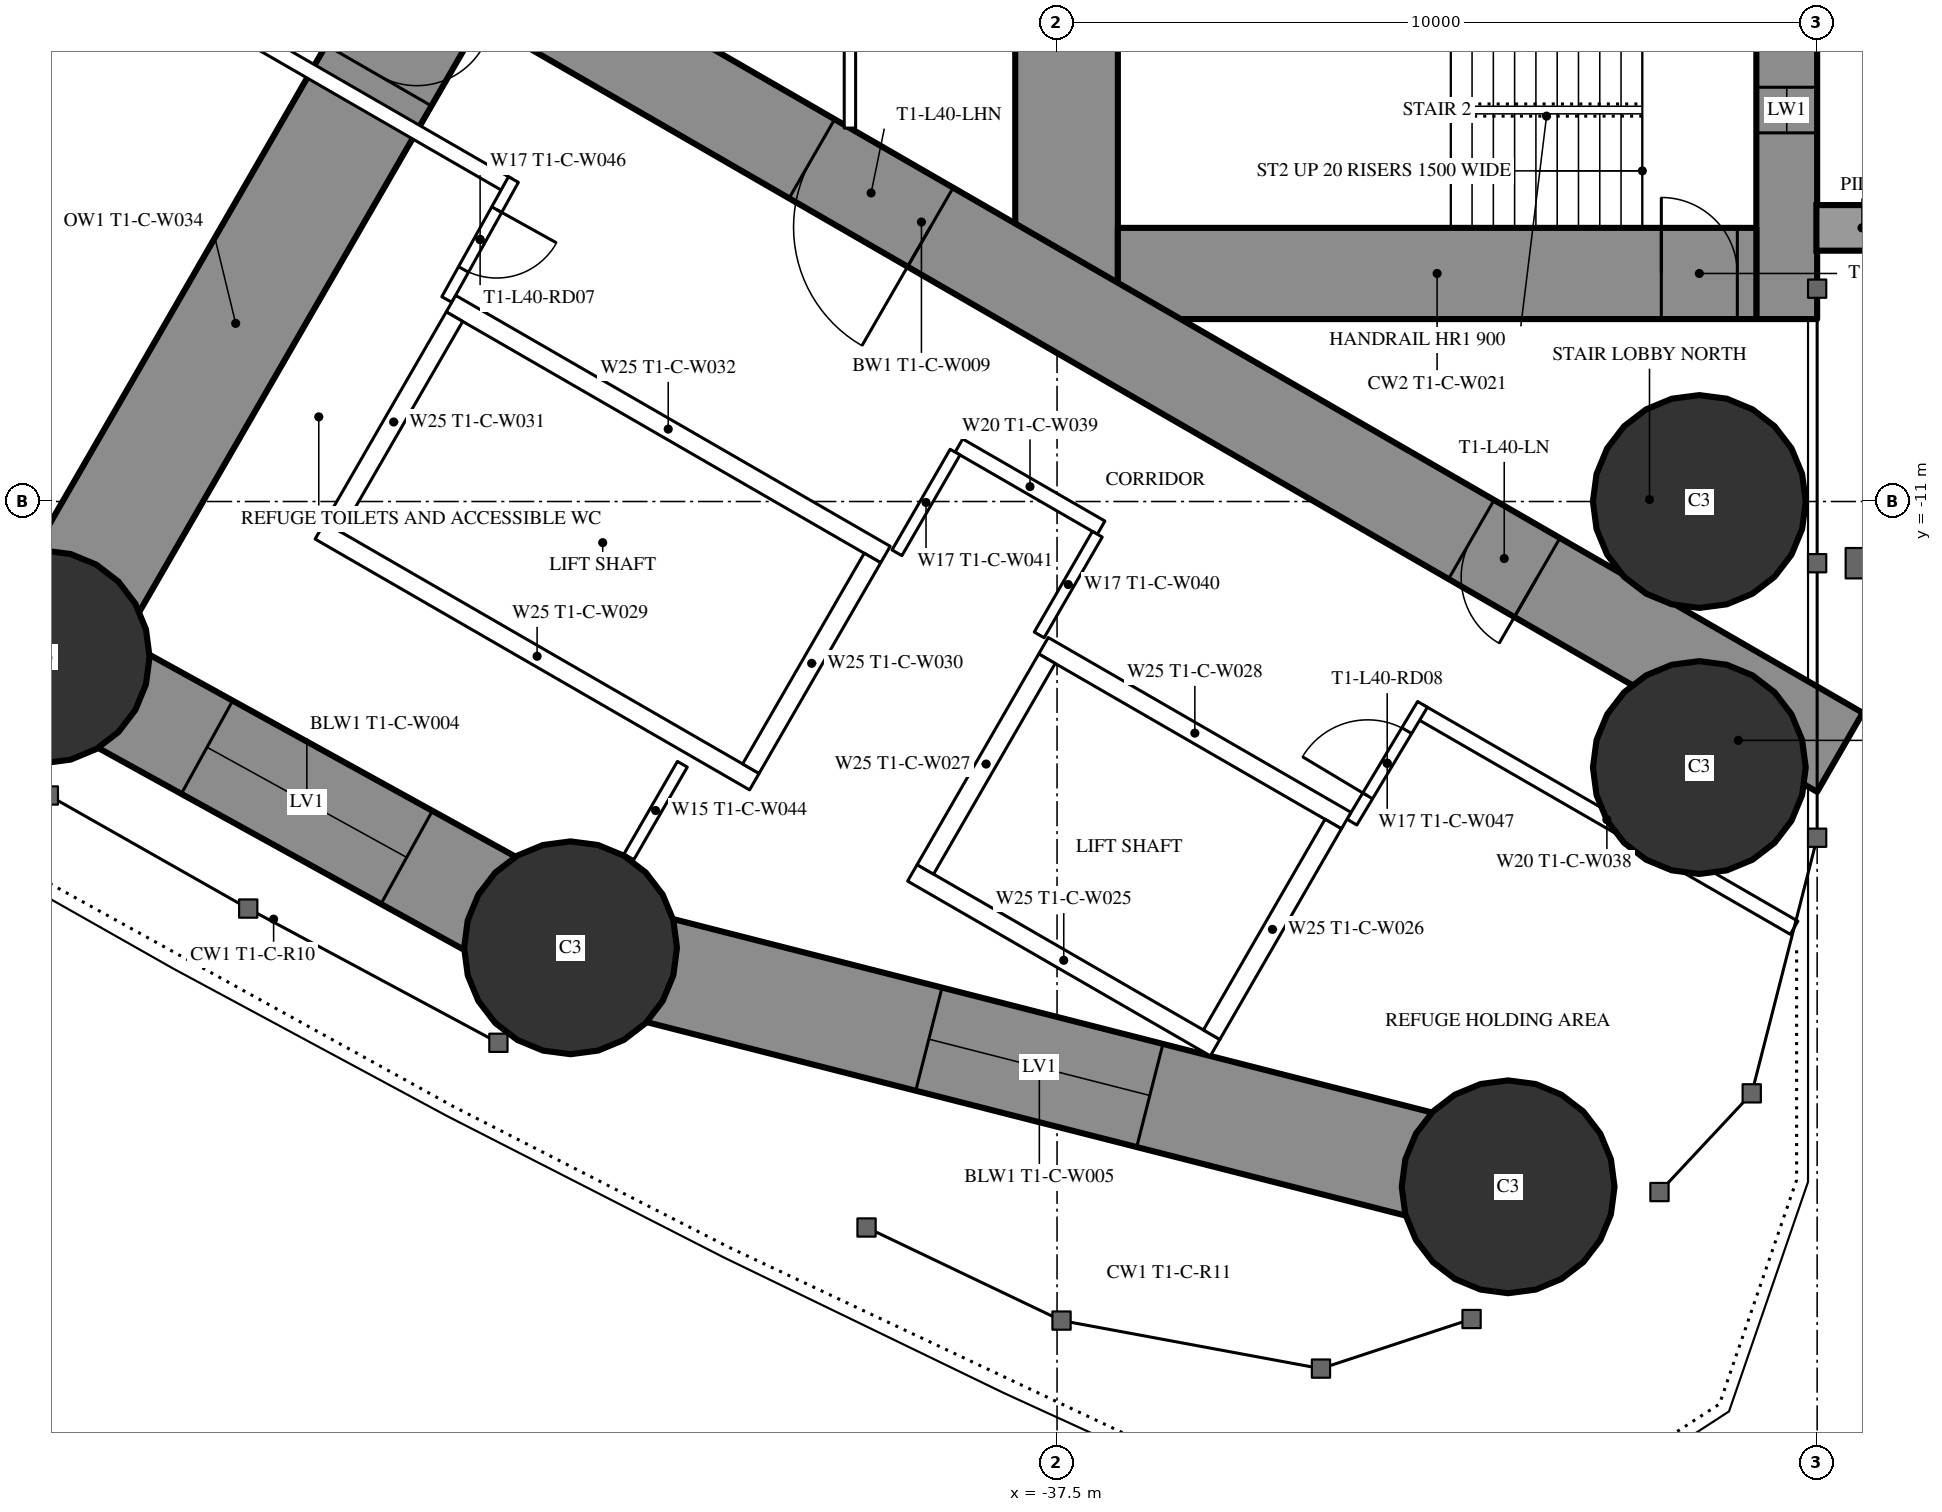
"""IFC4 building model, lengths in metres.
Left out: names, types, materials, properties, quantities, classifications, styles, units other than length and angle.
Written with IfcOpenShell. Run it as: python <this file> out.ifc"""

import sys

from ifc_helpers import new_model, si_unit, direction, frame, frame_2d, origin, origin_2d, place, context, subcontext, project, spatial, rectangle, circle, extrude, element, fill, save


model = new_model("IFC4")
c1 = context("Model", 3, precision=1e-05, world=origin(), true_north=direction((0.0, 1.0)))
c2 = subcontext(c1, "Body", "Model", "MODEL_VIEW")
j1 = project(units=[si_unit("LENGTHUNIT", "METRE"), si_unit("PLANEANGLEUNIT", "RADIAN")], contexts=[c1])
p1 = place(None, origin())
s1 = spatial("IfcSite", under=j1, at=p1, CompositionType="ELEMENT")
p2 = place(p1, origin())
s2 = spatial("IfcBuilding", under=s1, at=p2, CompositionType="ELEMENT")
p3 = place(p2, frame((0.0, 0.0, 152.7)))
s3 = spatial("IfcBuildingStorey", under=s2, at=p3, CompositionType="ELEMENT", Elevation=152.7)
for number, where, z_axis, x_axis in (
    (1, (-31.565, -20.016, 0.0), (0.0, 0.0, 1.0), (1.0, 0.0, 0.0)),
    (2, (-29.05, -11.0, 0.0), (0.0, 0.0, 1.0), (1.0, 0.0, 0.0)),
    (3, (-29.05, -14.5, 0.0), (0.0, 0.0, 1.0), (1.0, 0.0, 0.0)),
    (4, (-50.839, -13.043, 0.0), (0.0, 0.0, 1.0), (1.0, 0.0, 0.0)),
    (5, (-43.9, -16.871, 0.0), (0.0, 0.0, 1.0), (1.0, 0.0, 0.0)),
):
    element("IfcColumn", number, at=place(p3, frame(where, z_axis=z_axis, x_axis=x_axis)), inside=s3, PredefinedType="COLUMN", context=c2, shape_type="SweptSolid", body=[
        extrude(circle(Radius=1.4, at=origin_2d()), origin(), (0.0, 0.0, 1.0), 3.6),
    ])
p4 = place(p3, frame((-27.9, 8.6, 0.0), z_axis=(0.0, 0.0, 1.0), x_axis=(0.0, -1.0, 0.0)))
e6 = element("IfcWall", 6, at=p4, inside=s3, PredefinedType="SHEAR", context=c2, shape_type="SweptSolid", body=[
    extrude(rectangle(XDim=17.2, YDim=0.8, at=frame_2d((8.6, 0.0))), origin(), (0.0, 0.0, 1.0), 3.6),
])
p5 = place(p4, frame((2.45, 0.0, 0.6)))
e7 = element("IfcOpeningElement", 7, at=p5, cuts=e6, PredefinedType="OPENING", context=c2, shape_type="SweptSolid", body=[
    extrude(rectangle(XDim=0.6, YDim=2.1, at=frame_2d((0.3, 1.05))), frame((0.0, 0.41, 0.0), z_axis=(0.0, -1.0, 0.0), x_axis=(1.0, 0.0, 0.0)), (0.0, 0.0, 1.0), 0.82),
])
p6 = place(p4, frame((14.15, 0.0, 0.6)))
e8 = element("IfcOpeningElement", 8, at=p6, cuts=e6, PredefinedType="OPENING", context=c2, shape_type="SweptSolid", body=[
    extrude(rectangle(XDim=0.6, YDim=2.1, at=frame_2d((0.3, 1.05))), frame((0.0, 0.41, 0.0), z_axis=(0.0, -1.0, 0.0), x_axis=(1.0, 0.0, 0.0)), (0.0, 0.0, 1.0), 0.82),
])
p7 = place(p3, frame((-37.375, 8.6, 0.0), z_axis=(0.0, 0.0, 1.0), x_axis=(0.0, -1.0, 0.0)))
e9 = element("IfcWall", 9, at=p7, inside=s3, PredefinedType="SHEAR", context=c2, shape_type="SweptSolid", body=[
    extrude(rectangle(XDim=17.2, YDim=1.35, at=frame_2d((8.6, 0.0))), origin(), (0.0, 0.0, 1.0), 3.6),
])
p8 = place(p7, frame((7.7, 0.0, 0.0)))
e10 = element("IfcOpeningElement", 10, at=p8, cuts=e9, PredefinedType="OPENING", context=c2, shape_type="SweptSolid", body=[
    extrude(rectangle(XDim=1.8, YDim=2.2, at=frame_2d((0.9, 1.1))), frame((0.0, 0.685, 0.0), z_axis=(0.0, -1.0, 0.0), x_axis=(1.0, 0.0, 0.0)), (0.0, 0.0, 1.0), 1.37),
])
p9 = place(p3, frame((-28.3, -8.0, 0.0), z_axis=(0.0, 0.0, 1.0), x_axis=(-1.0, 0.0, 0.0)))
e11 = element("IfcWall", 11, at=p9, inside=s3, PredefinedType="SHEAR", context=c2, shape_type="SweptSolid", body=[
    extrude(rectangle(XDim=8.4, YDim=1.2, at=frame_2d((4.2, 0.0))), origin(), (0.0, 0.0, 1.0), 3.6),
])
p10 = place(p9, frame((0.25, 0.0, 0.0)))
e12 = element("IfcOpeningElement", 12, at=p10, cuts=e11, PredefinedType="OPENING", context=c2, shape_type="SweptSolid", body=[
    extrude(rectangle(XDim=1.0, YDim=2.2, at=frame_2d((0.5, 1.1))), frame((0.0, 0.61, 0.0), z_axis=(0.0, -1.0, 0.0), x_axis=(1.0, 0.0, 0.0)), (0.0, 0.0, 1.0), 1.22),
])
p11 = place(p3, frame((-27.2, -14.3, 0.0), z_axis=(0.0, 0.0, 1.0), x_axis=(-0.866024021859, 0.500002393557, 0.0)))
e13 = element("IfcWall", 13, at=p11, inside=s3, PredefinedType="SHEAR", context=c2, shape_type="SweptSolid", body=[
    extrude(rectangle(XDim=27.907, YDim=1.2, at=frame_2d((13.954, 0.0))), origin(), (0.0, 0.0, 1.0), 3.6),
])
p12 = place(p11, frame((4.6, 0.0, 0.0)))
e14 = element("IfcOpeningElement", 14, at=p12, cuts=e13, PredefinedType="OPENING", context=c2, shape_type="SweptSolid", body=[
    extrude(rectangle(XDim=1.0, YDim=2.2, at=frame_2d((0.5, 1.1))), frame((0.0, 0.61, 0.0), z_axis=(0.0, -1.0, 0.0), x_axis=(1.0, 0.0, 0.0)), (0.0, 0.0, 1.0), 1.22),
])
p13 = place(p11, frame((13.818, 0.0, 0.0)))
e15 = element("IfcOpeningElement", 15, at=p13, cuts=e13, PredefinedType="OPENING", context=c2, shape_type="SweptSolid", body=[
    extrude(rectangle(XDim=1.8, YDim=2.2, at=frame_2d((0.9, 1.1))), frame((0.0, 0.61, 0.0), z_axis=(0.0, -1.0, 0.0), x_axis=(1.0, 0.0, 0.0)), (0.0, 0.0, 1.0), 1.22),
])
p14 = place(p3, frame((-45.773, -4.27, 0.0), z_axis=(0.0, 0.0, 1.0), x_axis=(-0.499995723283, -0.866027872934, 0.0)))
e16 = element("IfcWall", 16, at=p14, inside=s3, PredefinedType="SHEAR", context=c2, shape_type="SweptSolid", body=[
    extrude(rectangle(XDim=10.131, YDim=1.6, at=frame_2d((5.065, 0.0))), origin(), (0.0, 0.0, 1.0), 3.6),
])
p15 = place(p14, frame((0.3, 0.0, 0.0)))
e17 = element("IfcOpeningElement", 17, at=p15, cuts=e16, PredefinedType="OPENING", context=c2, shape_type="SweptSolid", body=[
    extrude(rectangle(XDim=1.0, YDim=2.2, at=frame_2d((0.5, 1.1))), frame((0.0, 0.81, 0.0), z_axis=(0.0, -1.0, 0.0), x_axis=(1.0, 0.0, 0.0)), (0.0, 0.0, 1.0), 1.62),
])
p16 = place(p3, frame((-57.59, -8.893, 0.0), z_axis=(0.0, 0.0, 1.0), x_axis=(0.851892008043, -0.523717487423, 0.0)))
e18 = element("IfcWall", 18, at=p16, inside=s3, PredefinedType="SHEAR", context=c2, shape_type="SweptSolid", body=[
    extrude(rectangle(XDim=7.924, YDim=1.4, at=frame_2d((3.962, 0.0))), origin(), (0.0, 0.0, 1.0), 3.6),
])
p17 = place(p16, frame((2.462, 0.0, 0.6)))
e19 = element("IfcOpeningElement", 19, at=p17, cuts=e18, PredefinedType="OPENING", context=c2, shape_type="SweptSolid", body=[
    extrude(rectangle(XDim=3.0, YDim=1.2, at=frame_2d((1.5, 0.6))), frame((0.0, 0.71, 0.0), z_axis=(0.0, -1.0, 0.0), x_axis=(1.0, 0.0, 0.0)), (0.0, 0.0, 1.0), 1.42),
])
p18 = place(p3, frame((-50.839, -13.043, 0.0), z_axis=(0.0, 0.0, 1.0), x_axis=(0.875577684027, -0.483077342911, 0.0)))
e20 = element("IfcWall", 20, at=p18, inside=s3, PredefinedType="SHEAR", context=c2, shape_type="SweptSolid", body=[
    extrude(rectangle(XDim=7.925, YDim=1.4, at=frame_2d((3.962, 0.0))), origin(), (0.0, 0.0, 1.0), 3.6),
])
p19 = place(p18, frame((2.462, 0.0, 0.6)))
e21 = element("IfcOpeningElement", 21, at=p19, cuts=e20, PredefinedType="OPENING", context=c2, shape_type="SweptSolid", body=[
    extrude(rectangle(XDim=3.0, YDim=1.2, at=frame_2d((1.5, 0.6))), frame((0.0, 0.71, 0.0), z_axis=(0.0, -1.0, 0.0), x_axis=(1.0, 0.0, 0.0)), (0.0, 0.0, 1.0), 1.42),
])
p20 = place(p3, frame((-43.9, -16.871, 0.0), z_axis=(0.0, 0.0, 1.0), x_axis=(0.969008414312, -0.247027717052, 0.0)))
e22 = element("IfcWall", 22, at=p20, inside=s3, PredefinedType="SHEAR", context=c2, shape_type="SweptSolid", body=[
    extrude(rectangle(XDim=12.729, YDim=1.4, at=frame_2d((6.365, 0.0))), origin(), (0.0, 0.0, 1.0), 3.6),
])
p21 = place(p20, frame((4.865, 0.0, 0.6)))
e23 = element("IfcOpeningElement", 23, at=p21, cuts=e22, PredefinedType="OPENING", context=c2, shape_type="SweptSolid", body=[
    extrude(rectangle(XDim=3.0, YDim=1.2, at=frame_2d((1.5, 0.6))), frame((0.0, 0.71, 0.0), z_axis=(0.0, -1.0, 0.0), x_axis=(1.0, 0.0, 0.0)), (0.0, 0.0, 1.0), 1.42),
])
p22 = place(p3, frame((-42.429, -14.457, 0.0), z_axis=(0.0, 0.0, 1.0), x_axis=(-0.5000578829, -0.865991982497, 0.0)))
e24 = element("IfcWall", 24, at=p22, inside=s3, PredefinedType="PARTITIONING", context=c2, shape_type="SweptSolid", body=[
    extrude(rectangle(XDim=1.407, YDim=0.15, at=frame_2d((0.704, 0.0))), origin(), (0.0, 0.0, 1.0), 3.35),
])
p23 = place(p3, frame((-27.803, -16.608, 0.0), z_axis=(0.0, 0.0, 1.0), x_axis=(-0.866021198669, 0.500007283403, 0.0)))
e25 = element("IfcWall", 25, at=p23, inside=s3, PredefinedType="PARTITIONING", context=c2, shape_type="SweptSolid", body=[
    extrude(rectangle(XDim=5.688, YDim=0.2, at=frame_2d((2.844, 0.0))), origin(), (0.0, 0.0, 1.0), 3.35),
])
p24 = place(p3, frame((-36.92, -11.344, 0.0), z_axis=(0.0, 0.0, 1.0), x_axis=(-0.866065156741, 0.499931139538, 0.0)))
e26 = element("IfcWall", 26, at=p24, inside=s3, PredefinedType="PARTITIONING", context=c2, shape_type="SweptSolid", body=[
    extrude(rectangle(XDim=2.16, YDim=0.2, at=frame_2d((1.08, 0.0))), origin(), (0.0, 0.0, 1.0), 3.35),
])
p25 = place(p3, frame((-44.715, -6.844, 0.0), z_axis=(0.0, 0.0, 1.0), x_axis=(-0.866025261224, 0.500000246922, 0.0)))
e27 = element("IfcWall", 27, at=p25, inside=s3, PredefinedType="PARTITIONING", context=c2, shape_type="SweptSolid", body=[
    extrude(rectangle(XDim=13.567, YDim=0.2, at=frame_2d((6.783, 0.0))), origin(), (0.0, 0.0, 1.0), 3.35),
])
p26 = place(p25, frame((6.719, 0.0, 0.0)))
e28 = element("IfcOpeningElement", 28, at=p26, cuts=e27, PredefinedType="OPENING", context=c2, shape_type="SweptSolid", body=[
    extrude(rectangle(XDim=1.8, YDim=2.2, at=frame_2d((0.9, 1.1))), frame((0.0, 0.11, 0.0), z_axis=(0.0, -1.0, 0.0), x_axis=(1.0, 0.0, 0.0)), (0.0, 0.0, 1.0), 0.22),
])
p27 = place(p3, frame((-44.652, -6.764, 0.0), z_axis=(0.0, 0.0, 1.0), x_axis=(-0.485528096672, -0.8742210632, 0.0)))
e29 = element("IfcWall", 29, at=p27, inside=s3, PredefinedType="PARTITIONING", context=c2, shape_type="SweptSolid", body=[
    extrude(rectangle(XDim=1.805, YDim=0.15, at=frame_2d((0.903, 0.0))), origin(), (0.0, 0.0, 1.0), 3.35),
])
p28 = place(p27, frame((0.453, 0.0, 0.0)))
e30 = element("IfcOpeningElement", 30, at=p28, cuts=e29, PredefinedType="OPENING", context=c2, shape_type="SweptSolid", body=[
    extrude(rectangle(XDim=0.9, YDim=2.04, at=frame_2d((0.45, 1.02))), frame((0.0, 0.085, 0.0), z_axis=(0.0, -1.0, 0.0), x_axis=(1.0, 0.0, 0.0)), (0.0, 0.0, 1.0), 0.17),
])
p29 = place(p3, frame((-33.621, -15.218, 0.0), z_axis=(0.0, 0.0, 1.0), x_axis=(0.514336634837, 0.857588377991, 0.0)))
e31 = element("IfcWall", 31, at=p29, inside=s3, PredefinedType="PARTITIONING", context=c2, shape_type="SweptSolid", body=[
    extrude(rectangle(XDim=1.805, YDim=0.15, at=frame_2d((0.903, 0.0))), origin(), (0.0, 0.0, 1.0), 3.35),
])
p30 = place(p29, frame((0.403, 0.0, 0.0)))
e32 = element("IfcOpeningElement", 32, at=p30, cuts=e31, PredefinedType="OPENING", context=c2, shape_type="SweptSolid", body=[
    extrude(rectangle(XDim=1.0, YDim=2.04, at=frame_2d((0.5, 1.02))), frame((0.0, 0.085, 0.0), z_axis=(0.0, -1.0, 0.0), x_axis=(1.0, 0.0, 0.0)), (0.0, 0.0, 1.0), 0.17),
])
p31 = place(p3, frame((-36.97, -11.43, 0.0), z_axis=(0.0, 0.0, 1.0), x_axis=(-0.499985008713, -0.866034058835, 0.0)))
e33 = element("IfcWall", 33, at=p31, inside=s3, PredefinedType="PARTITIONING", context=c2, shape_type="SweptSolid", body=[
    extrude(rectangle(XDim=1.529, YDim=0.15, at=frame_2d((0.765, 0.0))), origin(), (0.0, 0.0, 1.0), 3.35),
])
p32 = place(p3, frame((-38.841, -10.35, 0.0), z_axis=(0.0, 0.0, 1.0), x_axis=(-0.499966498333, -0.866044745117, 0.0)))
e34 = element("IfcWall", 34, at=p32, inside=s3, PredefinedType="PARTITIONING", context=c2, shape_type="SweptSolid", body=[
    extrude(rectangle(XDim=1.53, YDim=0.15, at=frame_2d((0.765, 0.0))), origin(), (0.0, 0.0, 1.0), 3.35),
])
p33 = place(p3, frame((-40.225, 6.087, 0.0), z_axis=(0.0, 0.0, 1.0), x_axis=(0.0, -1.0, 0.0)))
e35 = element("IfcWall", 35, at=p33, inside=s3, PredefinedType="PARTITIONING", context=c2, shape_type="SweptSolid", body=[
    extrude(rectangle(XDim=12.174, YDim=0.15, at=frame_2d((6.087, 0.0))), origin(), (0.0, 0.0, 1.0), 3.35),
])
p34 = place(p33, frame((5.187, 0.0, 0.0)))
e36 = element("IfcOpeningElement", 36, at=p34, cuts=e35, PredefinedType="OPENING", context=c2, shape_type="SweptSolid", body=[
    extrude(rectangle(XDim=1.8, YDim=2.2, at=frame_2d((0.9, 1.1))), frame((0.0, 0.085, 0.0), z_axis=(0.0, -1.0, 0.0), x_axis=(1.0, 0.0, 0.0)), (0.0, 0.0, 1.0), 0.17),
])
p35 = place(p3, frame((-33.696, -15.197, 0.0), z_axis=(0.0, 0.0, 1.0), x_axis=(-0.865976953817, 0.500083908417, 0.0)))
e37 = element("IfcWall", 37, at=p35, inside=s3, PredefinedType="PARTITIONING", context=c2, shape_type="SweptSolid", body=[
    extrude(rectangle(XDim=4.599, YDim=0.25, at=frame_2d((2.3, 0.0))), origin(), (0.0, 0.0, 1.0), 3.35),
])
p36 = place(p3, frame((-35.42, -18.186, 0.0), z_axis=(0.0, 0.0, 1.0), x_axis=(-0.865990227814, 0.50006092162, 0.0)))
e38 = element("IfcWall", 38, at=p36, inside=s3, PredefinedType="PARTITIONING", context=c2, shape_type="SweptSolid", body=[
    extrude(rectangle(XDim=4.6, YDim=0.25, at=frame_2d((2.3, 0.0))), origin(), (0.0, 0.0, 1.0), 3.35),
])
p37 = place(p3, frame((-33.866, -15.243, 0.0), z_axis=(0.0, 0.0, 1.0), x_axis=(-0.499929347863, -0.866066190972, 0.0)))
e39 = element("IfcWall", 39, at=p37, inside=s3, PredefinedType="PARTITIONING", context=c2, shape_type="SweptSolid", body=[
    extrude(rectangle(XDim=3.201, YDim=0.25, at=frame_2d((1.6, 0.0))), origin(), (0.0, 0.0, 1.0), 3.35),
])
p38 = place(p3, frame((-37.633, -13.068, 0.0), z_axis=(0.0, 0.0, 1.0), x_axis=(-0.499872130319, -0.866099216793, 0.0)))
e40 = element("IfcWall", 40, at=p38, inside=s3, PredefinedType="PARTITIONING", context=c2, shape_type="SweptSolid", body=[
    extrude(rectangle(XDim=3.2, YDim=0.25, at=frame_2d((1.6, 0.0))), origin(), (0.0, 0.0, 1.0), 3.35),
])
p39 = place(p3, frame((-39.758, -11.697, 0.0), z_axis=(0.0, 0.0, 1.0), x_axis=(-0.866024194504, 0.500002094529, 0.0)))
e41 = element("IfcWall", 41, at=p39, inside=s3, PredefinedType="PARTITIONING", context=c2, shape_type="SweptSolid", body=[
    extrude(rectangle(XDim=6.6, YDim=0.25, at=frame_2d((3.3, 0.0))), origin(), (0.0, 0.0, 1.0), 3.35),
])
p40 = place(p3, frame((-41.482, -14.686, 0.0), z_axis=(0.0, 0.0, 1.0), x_axis=(-0.86603344179, 0.499986077507, 0.0)))
e42 = element("IfcWall", 42, at=p40, inside=s3, PredefinedType="PARTITIONING", context=c2, shape_type="SweptSolid", body=[
    extrude(rectangle(XDim=6.6, YDim=0.25, at=frame_2d((3.3, 0.0))), origin(), (0.0, 0.0, 1.0), 3.35),
])
for number, where, z_axis, x_axis in (
    (43, (-39.928, -11.743, 0.0), (0.0, 0.0, 1.0), (-0.5, -0.866, 0.0)),
    (44, (-45.428, -8.568, 0.0), (0.0, 0.0, 1.0), (-0.5, -0.866, 0.0)),
):
    element("IfcWall", number, at=place(p3, frame(where, z_axis=z_axis, x_axis=x_axis)), inside=s3, PredefinedType="PARTITIONING", context=c2, shape_type="SweptSolid", body=[
        extrude(rectangle(XDim=3.201, YDim=0.25, at=frame_2d((1.6, 0.0))), origin(), (0.0, 0.0, 1.0), 3.35),
    ])
p41 = place(p19, origin())
e45 = element("IfcWindow", 45, at=p41, inside=s3, PartitioningType="SINGLE_PANEL", PredefinedType="WINDOW", context=c2, shape_type="SweptSolid", body=[
    extrude(rectangle(XDim=3.0, YDim=1.2, at=frame_2d((1.5, 0.6))), frame((0.0, 0.03, 0.0), z_axis=(0.0, -1.0, 0.0), x_axis=(1.0, 0.0, 0.0)), (0.0, 0.0, 1.0), 0.06),
])
fill(e21, e45)
p42 = place(p21, origin())
e46 = element("IfcWindow", 46, at=p42, inside=s3, PartitioningType="SINGLE_PANEL", PredefinedType="WINDOW", context=c2, shape_type="SweptSolid", body=[
    extrude(rectangle(XDim=3.0, YDim=1.2, at=frame_2d((1.5, 0.6))), frame((0.0, 0.03, 0.0), z_axis=(0.0, -1.0, 0.0), x_axis=(1.0, 0.0, 0.0)), (0.0, 0.0, 1.0), 0.06),
])
fill(e23, e46)
p43 = place(p15, origin())
e47 = element("IfcDoor", 47, at=p43, inside=s3, OperationType="SINGLE_SWING_LEFT", PredefinedType="DOOR", context=c2, shape_type="SweptSolid", body=[
    extrude(rectangle(XDim=1.0, YDim=2.2, at=frame_2d((0.5, 1.1))), frame((0.0, 0.025, 0.0), z_axis=(0.0, -1.0, 0.0), x_axis=(1.0, 0.0, 0.0)), (0.0, 0.0, 1.0), 0.05),
])
fill(e17, e47)
p44 = place(p28, origin())
e48 = element("IfcDoor", 48, at=p44, inside=s3, OperationType="SINGLE_SWING_LEFT", PredefinedType="DOOR", context=c2, shape_type="SweptSolid", body=[
    extrude(rectangle(XDim=0.9, YDim=2.04, at=frame_2d((0.45, 1.02))), frame((0.0, 0.025, 0.0), z_axis=(0.0, -1.0, 0.0), x_axis=(1.0, 0.0, 0.0)), (0.0, 0.0, 1.0), 0.05),
])
fill(e30, e48)
p45 = place(p30, origin())
e49 = element("IfcDoor", 49, at=p45, inside=s3, OperationType="SINGLE_SWING_LEFT", PredefinedType="DOOR", context=c2, shape_type="SweptSolid", body=[
    extrude(rectangle(XDim=1.0, YDim=2.04, at=frame_2d((0.5, 1.02))), frame((0.0, 0.025, 0.0), z_axis=(0.0, -1.0, 0.0), x_axis=(1.0, 0.0, 0.0)), (0.0, 0.0, 1.0), 0.05),
])
fill(e32, e49)
p46 = place(p12, origin())
e50 = element("IfcDoor", 50, at=p46, inside=s3, OperationType="SINGLE_SWING_LEFT", PredefinedType="DOOR", context=c2, shape_type="SweptSolid", body=[
    extrude(rectangle(XDim=1.0, YDim=2.2, at=frame_2d((0.5, 1.1))), frame((0.0, 0.025, 0.0), z_axis=(0.0, -1.0, 0.0), x_axis=(1.0, 0.0, 0.0)), (0.0, 0.0, 1.0), 0.05),
])
fill(e14, e50)
p47 = place(p13, origin())
e51 = element("IfcDoor", 51, at=p47, inside=s3, OperationType="DOUBLE_DOOR_SINGLE_SWING", PredefinedType="DOOR", context=c2, shape_type="SweptSolid", body=[
    extrude(rectangle(XDim=1.8, YDim=2.2, at=frame_2d((0.9, 1.1))), frame((0.0, 0.025, 0.0), z_axis=(0.0, -1.0, 0.0), x_axis=(1.0, 0.0, 0.0)), (0.0, 0.0, 1.0), 0.05),
])
fill(e15, e51)
p48 = place(p10, origin())
e52 = element("IfcDoor", 52, at=p48, inside=s3, OperationType="SINGLE_SWING_RIGHT", PredefinedType="DOOR", context=c2, shape_type="SweptSolid", body=[
    extrude(rectangle(XDim=1.0, YDim=2.2, at=frame_2d((0.5, 1.1))), frame((0.0, 0.025, 0.0), z_axis=(0.0, -1.0, 0.0), x_axis=(1.0, 0.0, 0.0)), (0.0, 0.0, 1.0), 0.05),
])
fill(e12, e52)
p49 = place(p6, origin())
e53 = element("IfcWindow", 53, at=p49, inside=s3, PartitioningType="SINGLE_PANEL", PredefinedType="WINDOW", context=c2, shape_type="SweptSolid", body=[
    extrude(rectangle(XDim=0.6, YDim=2.1, at=frame_2d((0.3, 1.05))), frame((0.0, 0.03, 0.0), z_axis=(0.0, -1.0, 0.0), x_axis=(1.0, 0.0, 0.0)), (0.0, 0.0, 1.0), 0.06),
])
fill(e8, e53)
save(model, sys.argv[1])
